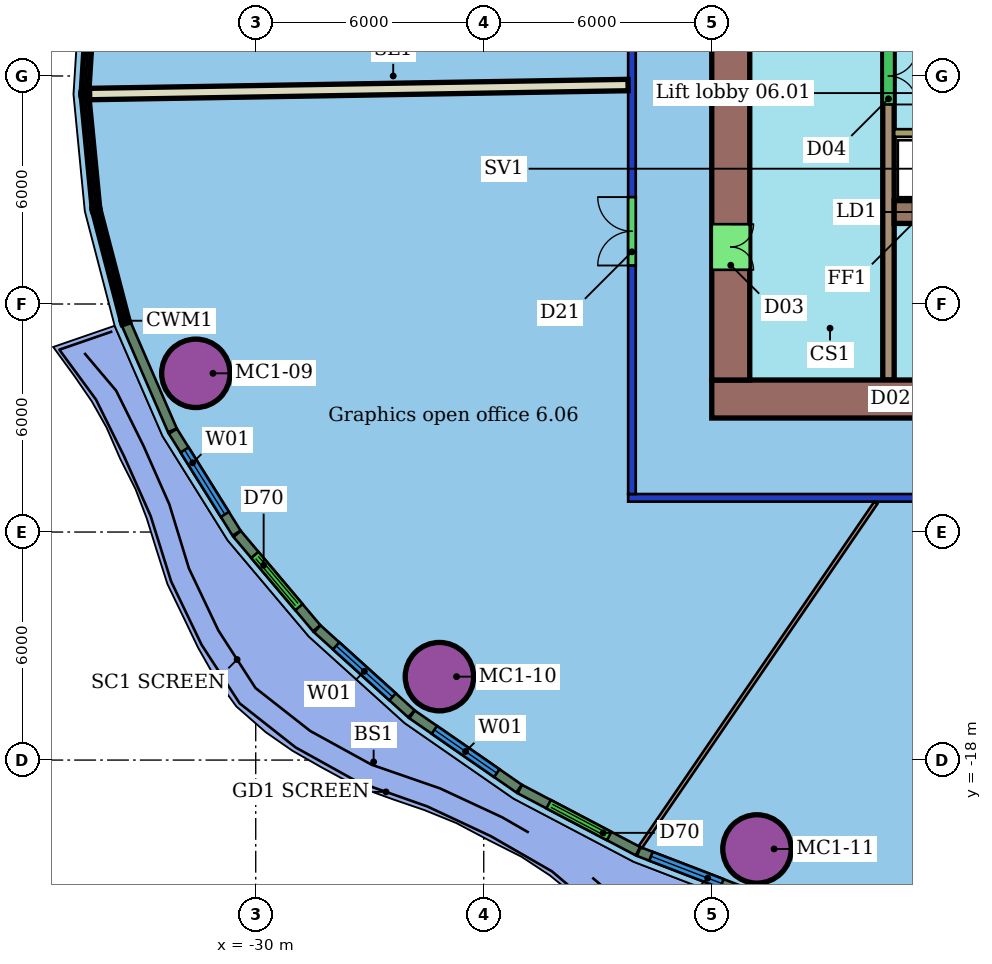
"""IFC4 building model, lengths in metres.
Left out: names, types, materials, properties, quantities, classifications, styles, units other than length and angle.
Written with IfcOpenShell. Run it as: python <this file> out.ifc"""

import sys

from ifc_helpers import new_model, si_unit, direction, frame, frame_2d, origin, origin_2d, place, context, subcontext, project, spatial, rectangle, hollow_circle, extrude, element, fill, save


model = new_model("IFC4")
c1 = context("Model", 3, precision=1e-05, world=origin(), true_north=direction((0.0, 1.0)))
c2 = subcontext(c1, "Body", "Model", "MODEL_VIEW")
j1 = project(units=[si_unit("LENGTHUNIT", "METRE"), si_unit("PLANEANGLEUNIT", "RADIAN")], contexts=[c1])
p1 = place(None, origin())
s1 = spatial("IfcSite", under=j1, at=p1, CompositionType="ELEMENT")
p2 = place(p1, origin())
s2 = spatial("IfcBuilding", under=s1, at=p2, CompositionType="ELEMENT")
p3 = place(p2, frame((0.0, 0.0, 39.7)))
s3 = spatial("IfcBuildingStorey", under=s2, at=p3, CompositionType="ELEMENT", Elevation=39.7)
for number, where, z_axis, x_axis in (
    (1, (-31.575, -7.824, 0.0), (0.0, 0.0, 1.0), (1.0, 0.0, 0.0)),
    (2, (-25.166, -15.805, 0.0), (0.0, 0.0, 1.0), (1.0, 0.0, 0.0)),
    (3, (-16.81, -20.339, 0.0), (0.0, 0.0, 1.0), (1.0, 0.0, 0.0)),
):
    element("IfcColumn", number, at=place(p3, frame(where, z_axis=z_axis, x_axis=x_axis)), inside=s3, PredefinedType="COLUMN", context=c2, shape_type="SweptSolid", body=[
        extrude(hollow_circle(Radius=0.9, WallThickness=0.06, at=origin_2d()), origin(), (0.0, 0.0, 1.0), 3.55),
    ])
p4 = place(p3, frame((8.2, -11.1, 0.0), z_axis=(0.0, 0.0, 1.0), x_axis=(-1.0, 0.0, 0.0)))
e4 = element("IfcWall", 4, at=p4, inside=s3, PredefinedType="PARTITIONING", context=c2, shape_type="SweptSolid", body=[
    extrude(rectangle(XDim=28.4, YDim=0.2, at=frame_2d((14.2, 0.0))), origin(), (0.0, 0.0, 1.0), 2.85),
])
p5 = place(p4, frame((11.964, 0.0, 0.0)))
e5 = element("IfcOpeningElement", 5, at=p5, cuts=e4, PredefinedType="OPENING", context=c2, shape_type="SweptSolid", body=[
    extrude(rectangle(XDim=1.8, YDim=2.1, at=frame_2d((0.9, 1.05))), frame((0.0, 0.11, 0.0), z_axis=(0.0, -1.0, 0.0), x_axis=(1.0, 0.0, 0.0)), (0.0, 0.0, 1.0), 0.22),
])
p6 = place(p4, frame((4.356, 0.0, 0.0)))
e6 = element("IfcOpeningElement", 6, at=p6, cuts=e4, PredefinedType="OPENING", context=c2, shape_type="SweptSolid", body=[
    extrude(rectangle(XDim=1.8, YDim=2.1, at=frame_2d((0.9, 1.05))), frame((0.0, 0.11, 0.0), z_axis=(0.0, -1.0, 0.0), x_axis=(1.0, 0.0, 0.0)), (0.0, 0.0, 1.0), 0.22),
])
p7 = place(p3, frame((-20.1, -11.0, 0.0), z_axis=(0.0, 0.0, 1.0), x_axis=(0.0, 1.0, 0.0)))
e7 = element("IfcWall", 7, at=p7, inside=s3, PredefinedType="PARTITIONING", context=c2, shape_type="SweptSolid", body=[
    extrude(rectangle(XDim=22.0, YDim=0.2, at=frame_2d((11.0, 0.0))), origin(), (0.0, 0.0, 1.0), 2.85),
])
p8 = place(p7, frame((13.124, 0.0, 0.0)))
e8 = element("IfcOpeningElement", 8, at=p8, cuts=e7, PredefinedType="OPENING", context=c2, shape_type="SweptSolid", body=[
    extrude(rectangle(XDim=1.1, YDim=2.1, at=frame_2d((0.55, 1.05))), frame((0.0, 0.11, 0.0), z_axis=(0.0, -1.0, 0.0), x_axis=(1.0, 0.0, 0.0)), (0.0, 0.0, 1.0), 0.22),
])
p9 = place(p7, frame((6.013, 0.0, 0.0)))
e9 = element("IfcOpeningElement", 9, at=p9, cuts=e7, PredefinedType="OPENING", context=c2, shape_type="SweptSolid", body=[
    extrude(rectangle(XDim=1.8, YDim=2.1, at=frame_2d((0.9, 1.05))), frame((0.0, 0.11, 0.0), z_axis=(0.0, -1.0, 0.0), x_axis=(1.0, 0.0, 0.0)), (0.0, 0.0, 1.0), 0.22),
])
p10 = place(p3, frame((-34.37, -0.475, 0.0), z_axis=(0.0, 0.0, 1.0), x_axis=(0.999859758648, 0.016747030697, 0.0)))
e10 = element("IfcWall", 10, at=p10, inside=s3, PredefinedType="PARTITIONING", context=c2, shape_type="SweptSolid", body=[
    extrude(rectangle(XDim=14.17, YDim=0.3, at=frame_2d((7.085, 0.0))), origin(), (0.0, 0.0, 1.0), 3.55),
])
p11 = place(p3, frame((-19.88, -20.289, 0.0), z_axis=(0.0, 0.0, 1.0), x_axis=(0.564621729177, 0.82534980641, 0.0)))
e11 = element("IfcWall", 11, at=p11, inside=s3, PredefinedType="PARTITIONING", context=c2, shape_type="SweptSolid", body=[
    extrude(rectangle(XDim=10.978, YDim=0.1, at=frame_2d((5.489, 0.0))), origin(), (0.0, 0.0, 1.0), 3.55),
])
p12 = place(p3, frame((-33.406, -6.526, 0.0), z_axis=(0.0, 0.0, 1.0), x_axis=(0.398117264061, -0.917334532249, 0.0)))
e12 = element("IfcWall", 12, at=p12, inside=s3, PredefinedType="SOLIDWALL", context=c2, shape_type="SweptSolid", body=[
    extrude(rectangle(XDim=3.05, YDim=0.25, at=frame_2d((1.525, 0.0))), origin(), (0.0, 0.0, 1.0), 3.15),
])
p13 = place(p3, frame((-32.18, -9.347, 0.0), z_axis=(0.0, 0.0, 1.0), x_axis=(0.529936462225, -0.848037349416, 0.0)))
e13 = element("IfcWall", 13, at=p13, inside=s3, PredefinedType="SOLIDWALL", context=c2, shape_type="SweptSolid", body=[
    extrude(rectangle(XDim=3.161, YDim=0.25, at=frame_2d((1.581, 0.0))), origin(), (0.0, 0.0, 1.0), 3.15),
])
p14 = place(p13, frame((0.581, 0.0, 0.8)))
e14 = element("IfcOpeningElement", 14, at=p14, cuts=e13, PredefinedType="OPENING", context=c2, shape_type="SweptSolid", body=[
    extrude(rectangle(XDim=2.0, YDim=2.2, at=frame_2d((1.0, 1.1))), frame((0.0, 0.135, 0.0), z_axis=(0.0, -1.0, 0.0), x_axis=(1.0, 0.0, 0.0)), (0.0, 0.0, 1.0), 0.27),
])
p15 = place(p3, frame((-30.489, -12.049, 0.0), z_axis=(0.0, 0.0, 1.0), x_axis=(0.644879179912, -0.76428453034, 0.0)))
e15 = element("IfcWall", 15, at=p15, inside=s3, PredefinedType="SOLIDWALL", context=c2, shape_type="SweptSolid", body=[
    extrude(rectangle(XDim=3.245, YDim=0.25, at=frame_2d((1.623, 0.0))), origin(), (0.0, 0.0, 1.0), 3.15),
])
p16 = place(p15, frame((0.722, 0.0, 0.0)))
e16 = element("IfcOpeningElement", 16, at=p16, cuts=e15, PredefinedType="OPENING", context=c2, shape_type="SweptSolid", body=[
    extrude(rectangle(XDim=1.8, YDim=2.4, at=frame_2d((0.9, 1.2))), frame((0.0, 0.135, 0.0), z_axis=(0.0, -1.0, 0.0), x_axis=(1.0, 0.0, 0.0)), (0.0, 0.0, 1.0), 0.27),
])
p17 = place(p3, frame((-28.379, -14.547, 0.0), z_axis=(0.0, 0.0, 1.0), x_axis=(0.741993404353, -0.670407180672, 0.0)))
e17 = element("IfcWall", 17, at=p17, inside=s3, PredefinedType="SOLIDWALL", context=c2, shape_type="SweptSolid", body=[
    extrude(rectangle(XDim=3.335, YDim=0.25, at=frame_2d((1.668, 0.0))), origin(), (0.0, 0.0, 1.0), 3.15),
])
p18 = place(p17, frame((0.668, 0.0, 0.8)))
e18 = element("IfcOpeningElement", 18, at=p18, cuts=e17, PredefinedType="OPENING", context=c2, shape_type="SweptSolid", body=[
    extrude(rectangle(XDim=2.0, YDim=2.2, at=frame_2d((1.0, 1.1))), frame((0.0, 0.135, 0.0), z_axis=(0.0, -1.0, 0.0), x_axis=(1.0, 0.0, 0.0)), (0.0, 0.0, 1.0), 0.27),
])
p19 = place(p3, frame((-25.886, -16.798, 0.0), z_axis=(0.0, 0.0, 1.0), x_axis=(0.821704553171, -0.569913701623, 0.0)))
e19 = element("IfcWall", 19, at=p19, inside=s3, PredefinedType="SOLIDWALL", context=c2, shape_type="SweptSolid", body=[
    extrude(rectangle(XDim=3.427, YDim=0.25, at=frame_2d((1.713, 0.0))), origin(), (0.0, 0.0, 1.0), 3.15),
])
p20 = place(p19, frame((0.713, 0.0, 0.8)))
e20 = element("IfcOpeningElement", 20, at=p20, cuts=e19, PredefinedType="OPENING", context=c2, shape_type="SweptSolid", body=[
    extrude(rectangle(XDim=2.0, YDim=2.2, at=frame_2d((1.0, 1.1))), frame((0.0, 0.135, 0.0), z_axis=(0.0, -1.0, 0.0), x_axis=(1.0, 0.0, 0.0)), (0.0, 0.0, 1.0), 0.27),
])
p21 = place(p3, frame((-23.05, -18.763, 0.0), z_axis=(0.0, 0.0, 1.0), x_axis=(0.885034300513, -0.465525817667, 0.0)))
e21 = element("IfcWall", 21, at=p21, inside=s3, PredefinedType="SOLIDWALL", context=c2, shape_type="SweptSolid", body=[
    extrude(rectangle(XDim=3.512, YDim=0.25, at=frame_2d((1.756, 0.0))), origin(), (0.0, 0.0, 1.0), 3.15),
])
p22 = place(p21, frame((0.856, 0.0, 0.0)))
e22 = element("IfcOpeningElement", 22, at=p22, cuts=e21, PredefinedType="OPENING", context=c2, shape_type="SweptSolid", body=[
    extrude(rectangle(XDim=1.8, YDim=2.4, at=frame_2d((0.9, 1.2))), frame((0.0, 0.135, 0.0), z_axis=(0.0, -1.0, 0.0), x_axis=(1.0, 0.0, 0.0)), (0.0, 0.0, 1.0), 0.27),
])
p23 = place(p3, frame((-19.921, -20.407, 0.0), z_axis=(0.0, 0.0, 1.0), x_axis=(0.933305255529, -0.359083973468, 0.0)))
e23 = element("IfcWall", 23, at=p23, inside=s3, PredefinedType="SOLIDWALL", context=c2, shape_type="SweptSolid", body=[
    extrude(rectangle(XDim=3.587, YDim=0.25, at=frame_2d((1.793, 0.0))), origin(), (0.0, 0.0, 1.0), 3.15),
])
p24 = place(p23, frame((0.344, 0.0, 0.8)))
e24 = element("IfcOpeningElement", 24, at=p24, cuts=e23, PredefinedType="OPENING", context=c2, shape_type="SweptSolid", body=[
    extrude(rectangle(XDim=2.0, YDim=2.2, at=frame_2d((1.0, 1.1))), frame((0.0, 0.135, 0.0), z_axis=(0.0, -1.0, 0.0), x_axis=(1.0, 0.0, 0.0)), (0.0, 0.0, 1.0), 0.27),
])
p25 = place(p3, frame((-18.0, -8.5, 0.0), z_axis=(0.0, 0.0, 1.0), x_axis=(1.0, 0.0, 0.0)))
e25 = element("IfcWall", 25, at=p25, inside=s3, PredefinedType="SHEAR", context=c2, shape_type="SweptSolid", body=[
    extrude(rectangle(XDim=24.0, YDim=1.0, at=frame_2d((12.0, 0.0))), origin(), (0.0, 0.0, 1.0), 3.4),
])
p26 = place(p25, frame((6.0, 0.0, 0.0)))
e26 = element("IfcOpeningElement", 26, at=p26, cuts=e25, PredefinedType="OPENING", context=c2, shape_type="SweptSolid", body=[
    extrude(rectangle(XDim=1.2, YDim=2.1, at=frame_2d((0.6, 1.05))), frame((0.0, 0.51, 0.0), z_axis=(0.0, -1.0, 0.0), x_axis=(1.0, 0.0, 0.0)), (0.0, 0.0, 1.0), 1.02),
])
p27 = place(p3, frame((-17.5, 8.0, 0.0), z_axis=(0.0, 0.0, 1.0), x_axis=(0.0, -1.0, 0.0)))
e27 = element("IfcWall", 27, at=p27, inside=s3, PredefinedType="SHEAR", context=c2, shape_type="SweptSolid", body=[
    extrude(rectangle(XDim=16.0, YDim=1.0, at=frame_2d((8.0, 0.0))), origin(), (0.0, 0.0, 1.0), 3.4),
])
p28 = place(p27, frame((11.9, 0.0, 0.0)))
e28 = element("IfcOpeningElement", 28, at=p28, cuts=e27, PredefinedType="OPENING", context=c2, shape_type="SweptSolid", body=[
    extrude(rectangle(XDim=1.2, YDim=2.1, at=frame_2d((0.6, 1.05))), frame((0.0, 0.51, 0.0), z_axis=(0.0, -1.0, 0.0), x_axis=(1.0, 0.0, 0.0)), (0.0, 0.0, 1.0), 1.02),
])
p29 = place(p27, frame((2.9, 0.0, 0.0)))
e29 = element("IfcOpeningElement", 29, at=p29, cuts=e27, PredefinedType="OPENING", context=c2, shape_type="SweptSolid", body=[
    extrude(rectangle(XDim=1.2, YDim=2.1, at=frame_2d((0.6, 1.05))), frame((0.0, 0.51, 0.0), z_axis=(0.0, -1.0, 0.0), x_axis=(1.0, 0.0, 0.0)), (0.0, 0.0, 1.0), 1.02),
])
p30 = place(p3, frame((-13.2, -3.58, 0.0), z_axis=(0.0, 0.0, 1.0), x_axis=(1.0, 0.0, 0.0)))
e30 = element("IfcWall", 30, at=p30, inside=s3, PredefinedType="SHEAR", context=c2, shape_type="SweptSolid", body=[
    extrude(rectangle(XDim=7.2, YDim=0.6, at=frame_2d((3.6, 0.0))), origin(), (0.0, 0.0, 1.0), 3.4),
])
p31 = place(p30, frame((0.496, 0.0, 0.0)))
e31 = element("IfcOpeningElement", 31, at=p31, cuts=e30, PredefinedType="OPENING", context=c2, shape_type="SweptSolid", body=[
    extrude(rectangle(XDim=1.2, YDim=2.1, at=frame_2d((0.6, 1.05))), frame((0.0, 0.31, 0.0), z_axis=(0.0, -1.0, 0.0), x_axis=(1.0, 0.0, 0.0)), (0.0, 0.0, 1.0), 0.62),
])
p32 = place(p30, frame((2.938, 0.0, 0.0)))
e32 = element("IfcOpeningElement", 32, at=p32, cuts=e30, PredefinedType="OPENING", context=c2, shape_type="SweptSolid", body=[
    extrude(rectangle(XDim=1.2, YDim=2.1, at=frame_2d((0.6, 1.05))), frame((0.0, 0.31, 0.0), z_axis=(0.0, -1.0, 0.0), x_axis=(1.0, 0.0, 0.0)), (0.0, 0.0, 1.0), 0.62),
])
p33 = place(p3, frame((-13.35, 8.0, 0.0), z_axis=(0.0, 0.0, 1.0), x_axis=(0.0, -1.0, 0.0)))
e33 = element("IfcWall", 33, at=p33, inside=s3, PredefinedType="SHEAR", context=c2, shape_type="SweptSolid", body=[
    extrude(rectangle(XDim=16.0, YDim=0.3, at=frame_2d((8.0, 0.0))), origin(), (0.0, 0.0, 1.0), 3.4),
])
p34 = place(p33, frame((7.25, 0.0, 0.0)))
e34 = element("IfcOpeningElement", 34, at=p34, cuts=e33, PredefinedType="OPENING", context=c2, shape_type="SweptSolid", body=[
    extrude(rectangle(XDim=1.5, YDim=2.1, at=frame_2d((0.75, 1.05))), frame((0.0, 0.16, 0.0), z_axis=(0.0, -1.0, 0.0), x_axis=(1.0, 0.0, 0.0)), (0.0, 0.0, 1.0), 0.32),
])
p35 = place(p3, frame((1.2, -1.5, 0.0), z_axis=(0.0, 0.0, 1.0), x_axis=(-1.0, 0.0, 0.0)))
e35 = element("IfcWall", 35, at=p35, inside=s3, PredefinedType="SHEAR", context=c2, shape_type="SweptSolid", body=[
    extrude(rectangle(XDim=14.4, YDim=0.2, at=frame_2d((7.2, 0.0))), origin(), (0.0, 0.0, 1.0), 3.4),
])
p36 = place(p35, frame((7.821, 0.0, 0.0)))
e36 = element("IfcOpeningElement", 36, at=p36, cuts=e35, PredefinedType="OPENING", context=c2, shape_type="SweptSolid", body=[
    extrude(rectangle(XDim=1.2, YDim=2.1, at=frame_2d((0.6, 1.05))), frame((0.0, 0.11, 0.0), z_axis=(0.0, -1.0, 0.0), x_axis=(1.0, 0.0, 0.0)), (0.0, 0.0, 1.0), 0.22),
])
p37 = place(p35, frame((0.15, 0.0, 0.0)))
e37 = element("IfcOpeningElement", 37, at=p37, cuts=e35, PredefinedType="OPENING", context=c2, shape_type="SweptSolid", body=[
    extrude(rectangle(XDim=0.9, YDim=2.1, at=frame_2d((0.45, 1.05))), frame((0.0, 0.11, 0.0), z_axis=(0.0, -1.0, 0.0), x_axis=(1.0, 0.0, 0.0)), (0.0, 0.0, 1.0), 0.22),
])
p38 = place(p9, origin())
e38 = element("IfcDoor", 38, at=p38, inside=s3, OperationType="DOUBLE_DOOR_SINGLE_SWING", PredefinedType="DOOR", context=c2, shape_type="SweptSolid", body=[
    extrude(rectangle(XDim=1.8, YDim=2.1, at=frame_2d((0.9, 1.05))), frame((0.0, 0.025, 0.0), z_axis=(0.0, -1.0, 0.0), x_axis=(1.0, 0.0, 0.0)), (0.0, 0.0, 1.0), 0.05),
])
fill(e9, e38)
p39 = place(p14, origin())
e39 = element("IfcWindow", 39, at=p39, inside=s3, PartitioningType="SINGLE_PANEL", PredefinedType="WINDOW", context=c2, shape_type="SweptSolid", body=[
    extrude(rectangle(XDim=2.0, YDim=2.2, at=frame_2d((1.0, 1.1))), frame((0.0, 0.03, 0.0), z_axis=(0.0, -1.0, 0.0), x_axis=(1.0, 0.0, 0.0)), (0.0, 0.0, 1.0), 0.06),
])
fill(e14, e39)
p40 = place(p16, origin())
e40 = element("IfcDoor", 40, at=p40, inside=s3, OperationType="DOUBLE_DOOR_SLIDING", PredefinedType="DOOR", context=c2, shape_type="SweptSolid", body=[
    extrude(rectangle(XDim=1.8, YDim=2.4, at=frame_2d((0.9, 1.2))), frame((0.0, 0.025, 0.0), z_axis=(0.0, -1.0, 0.0), x_axis=(1.0, 0.0, 0.0)), (0.0, 0.0, 1.0), 0.05),
])
fill(e16, e40)
p41 = place(p18, origin())
e41 = element("IfcWindow", 41, at=p41, inside=s3, PartitioningType="SINGLE_PANEL", PredefinedType="WINDOW", context=c2, shape_type="SweptSolid", body=[
    extrude(rectangle(XDim=2.0, YDim=2.2, at=frame_2d((1.0, 1.1))), frame((0.0, 0.03, 0.0), z_axis=(0.0, -1.0, 0.0), x_axis=(1.0, 0.0, 0.0)), (0.0, 0.0, 1.0), 0.06),
])
fill(e18, e41)
p42 = place(p20, origin())
e42 = element("IfcWindow", 42, at=p42, inside=s3, PartitioningType="SINGLE_PANEL", PredefinedType="WINDOW", context=c2, shape_type="SweptSolid", body=[
    extrude(rectangle(XDim=2.0, YDim=2.2, at=frame_2d((1.0, 1.1))), frame((0.0, 0.03, 0.0), z_axis=(0.0, -1.0, 0.0), x_axis=(1.0, 0.0, 0.0)), (0.0, 0.0, 1.0), 0.06),
])
fill(e20, e42)
p43 = place(p22, origin())
e43 = element("IfcDoor", 43, at=p43, inside=s3, OperationType="DOUBLE_DOOR_SLIDING", PredefinedType="DOOR", context=c2, shape_type="SweptSolid", body=[
    extrude(rectangle(XDim=1.8, YDim=2.4, at=frame_2d((0.9, 1.2))), frame((0.0, 0.025, 0.0), z_axis=(0.0, -1.0, 0.0), x_axis=(1.0, 0.0, 0.0)), (0.0, 0.0, 1.0), 0.05),
])
fill(e22, e43)
p44 = place(p24, origin())
e44 = element("IfcWindow", 44, at=p44, inside=s3, PartitioningType="SINGLE_PANEL", PredefinedType="WINDOW", context=c2, shape_type="SweptSolid", body=[
    extrude(rectangle(XDim=2.0, YDim=2.2, at=frame_2d((1.0, 1.1))), frame((0.0, 0.03, 0.0), z_axis=(0.0, -1.0, 0.0), x_axis=(1.0, 0.0, 0.0)), (0.0, 0.0, 1.0), 0.06),
])
fill(e24, e44)
p45 = place(p28, origin())
e45 = element("IfcDoor", 45, at=p45, inside=s3, OperationType="DOUBLE_DOOR_SINGLE_SWING", PredefinedType="NOTDEFINED", context=c2, shape_type="SweptSolid", body=[
    extrude(rectangle(XDim=1.2, YDim=2.1, at=frame_2d((0.6, 1.05))), frame((0.0, 0.025, 0.0), z_axis=(0.0, -1.0, 0.0), x_axis=(1.0, 0.0, 0.0)), (0.0, 0.0, 1.0), 0.05),
])
fill(e28, e45)
p46 = place(p34, origin())
e46 = element("IfcDoor", 46, at=p46, inside=s3, OperationType="DOUBLE_DOOR_SINGLE_SWING", PredefinedType="NOTDEFINED", context=c2, shape_type="SweptSolid", body=[
    extrude(rectangle(XDim=1.5, YDim=2.1, at=frame_2d((0.75, 1.05))), frame((0.0, 0.025, 0.0), z_axis=(0.0, -1.0, 0.0), x_axis=(1.0, 0.0, 0.0)), (0.0, 0.0, 1.0), 0.05),
])
fill(e34, e46)
save(model, sys.argv[1])
